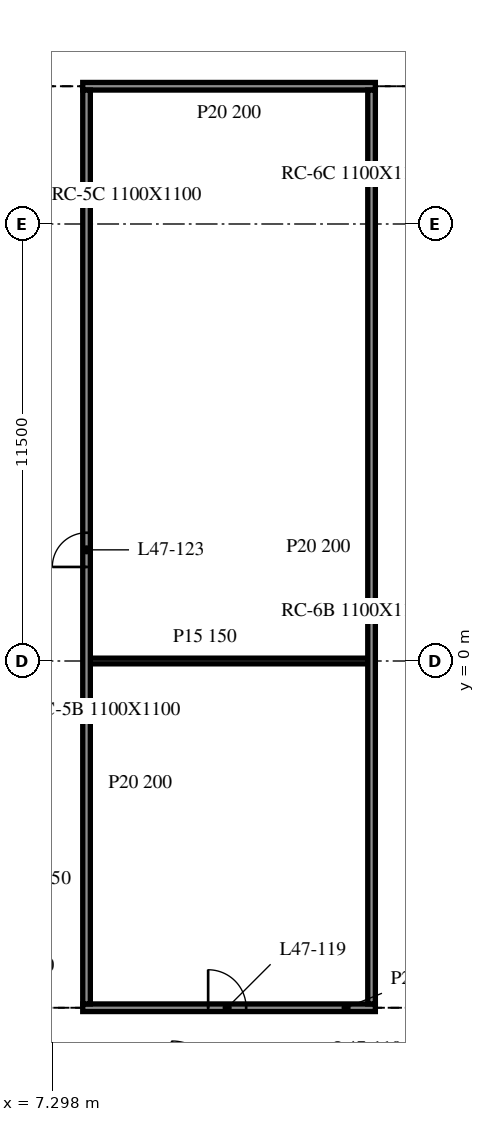
"""IFC4 building model, lengths in metres.
Left out: names, types, materials, properties, quantities, classifications, styles, units other than length and angle.
Written with IfcOpenShell. Run it as: python <this file> out.ifc"""

import sys

from ifc_helpers import new_model, si_unit, direction, frame, frame_2d, origin, place, context, subcontext, project, spatial, rectangle, extrude, element, fill, save


model = new_model("IFC4")
c1 = context("Model", 3, precision=1e-05, world=origin(), true_north=direction((0.0, 1.0)))
c2 = subcontext(c1, "Body", "Model", "MODEL_VIEW")
j1 = project(units=[si_unit("LENGTHUNIT", "METRE"), si_unit("PLANEANGLEUNIT", "RADIAN")], contexts=[c1])
p1 = place(None, origin())
s1 = spatial("IfcSite", under=j1, at=p1, CompositionType="ELEMENT")
p2 = place(p1, origin())
s2 = spatial("IfcBuilding", under=s1, at=p2, CompositionType="ELEMENT")
p3 = place(p2, frame((0.0, 0.0, 197.7)))
s3 = spatial("IfcBuildingStorey", under=s2, at=p3, CompositionType="ELEMENT", Elevation=197.7)
p4 = place(p3, frame((8.1, -9.125, 0.0), z_axis=(0.0, 0.0, 1.0), x_axis=(1.0, 0.0, 0.0)))
e1 = element("IfcWall", 1, at=p4, inside=s3, PredefinedType="PARTITIONING", context=c2, shape_type="SweptSolid", body=[
    extrude(rectangle(XDim=7.7, YDim=0.2, at=frame_2d((3.85, 0.0))), origin(), (0.0, 0.0, 1.0), 3.46),
])
p5 = place(p4, frame((3.3, 0.0, 0.0)))
e2 = element("IfcOpeningElement", 2, at=p5, cuts=e1, PredefinedType="OPENING", context=c2, shape_type="SweptSolid", body=[
    extrude(rectangle(XDim=1.0, YDim=2.1, at=frame_2d((0.5, 1.05))), frame((0.0, 0.11, 0.0), z_axis=(0.0, -1.0, 0.0), x_axis=(1.0, 0.0, 0.0)), (0.0, 0.0, 1.0), 0.22),
])
p6 = place(p3, frame((8.3, 0.0, 0.0), z_axis=(0.0, 0.0, 1.0), x_axis=(1.0, 0.0, 0.0)))
e3 = element("IfcWall", 3, at=p6, inside=s3, PredefinedType="PARTITIONING", context=c2, shape_type="SweptSolid", body=[
    extrude(rectangle(XDim=7.3, YDim=0.15, at=frame_2d((3.65, 0.0))), origin(), (0.0, 0.0, 1.0), 3.46),
])
p7 = place(p3, frame((8.1, 15.125, 0.0), z_axis=(0.0, 0.0, 1.0), x_axis=(1.0, 0.0, 0.0)))
e4 = element("IfcWall", 4, at=p7, inside=s3, PredefinedType="PARTITIONING", context=c2, shape_type="SweptSolid", body=[
    extrude(rectangle(XDim=7.7, YDim=0.2, at=frame_2d((3.85, 0.0))), origin(), (0.0, 0.0, 1.0), 3.46),
])
p8 = place(p3, frame((8.2, -9.025, 0.0), z_axis=(0.0, 0.0, 1.0), x_axis=(0.0, 1.0, 0.0)))
e5 = element("IfcWall", 5, at=p8, inside=s3, PredefinedType="PARTITIONING", context=c2, shape_type="SweptSolid", body=[
    extrude(rectangle(XDim=24.05, YDim=0.2, at=frame_2d((12.025, 0.0))), origin(), (0.0, 0.0, 1.0), 3.46),
])
p9 = place(p8, frame((11.5, 0.0, 0.0)))
e6 = element("IfcOpeningElement", 6, at=p9, cuts=e5, PredefinedType="OPENING", context=c2, shape_type="SweptSolid", body=[
    extrude(rectangle(XDim=0.9, YDim=2.1, at=frame_2d((0.45, 1.05))), frame((0.0, 0.11, 0.0), z_axis=(0.0, -1.0, 0.0), x_axis=(1.0, 0.0, 0.0)), (0.0, 0.0, 1.0), 0.22),
])
p10 = place(p3, frame((15.7, -9.025, 0.0), z_axis=(0.0, 0.0, 1.0), x_axis=(0.0, 1.0, 0.0)))
e7 = element("IfcWall", 7, at=p10, inside=s3, PredefinedType="PARTITIONING", context=c2, shape_type="SweptSolid", body=[
    extrude(rectangle(XDim=24.05, YDim=0.2, at=frame_2d((12.025, 0.0))), origin(), (0.0, 0.0, 1.0), 3.46),
])
p11 = place(p5, origin())
e8 = element("IfcDoor", 8, at=p11, inside=s3, OperationType="SINGLE_SWING_LEFT", PredefinedType="DOOR", context=c2, shape_type="SweptSolid", body=[
    extrude(rectangle(XDim=1.0, YDim=2.1, at=frame_2d((0.5, 1.05))), frame((0.0, 0.025, 0.0), z_axis=(0.0, -1.0, 0.0), x_axis=(1.0, 0.0, 0.0)), (0.0, 0.0, 1.0), 0.05),
])
fill(e2, e8)
p12 = place(p9, origin())
e9 = element("IfcDoor", 9, at=p12, inside=s3, OperationType="SINGLE_SWING_RIGHT", PredefinedType="DOOR", context=c2, shape_type="SweptSolid", body=[
    extrude(rectangle(XDim=0.9, YDim=2.1, at=frame_2d((0.45, 1.05))), frame((0.0, 0.025, 0.0), z_axis=(0.0, -1.0, 0.0), x_axis=(1.0, 0.0, 0.0)), (0.0, 0.0, 1.0), 0.05),
])
fill(e6, e9)
save(model, sys.argv[1])
